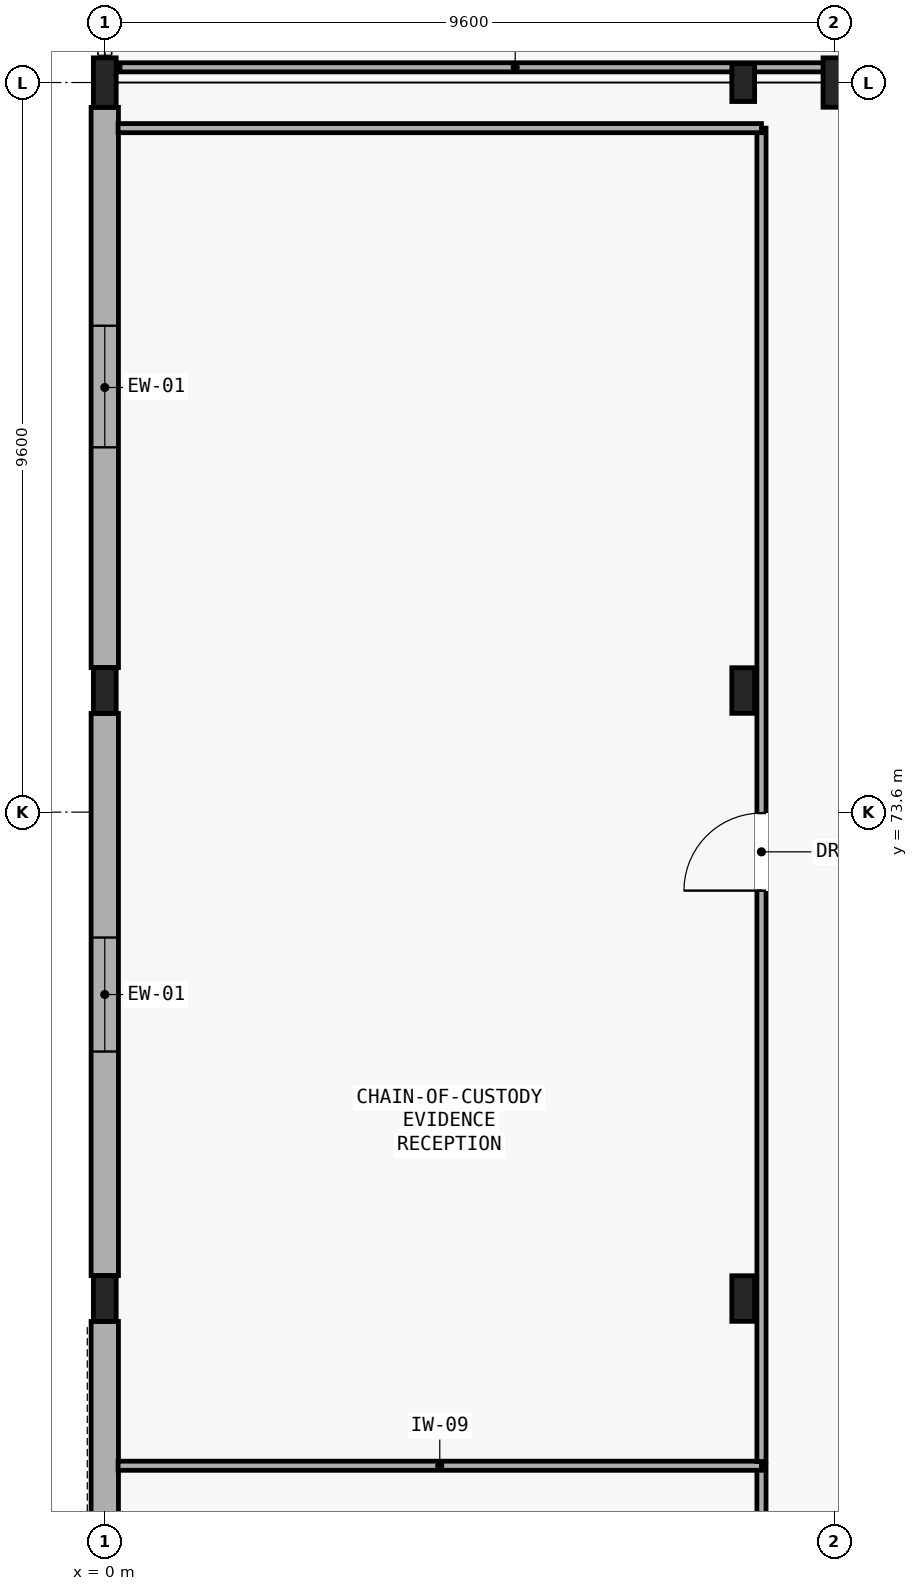
"""IFC4 building model, lengths in metres.
Left out: names, types, materials, properties, quantities, classifications, styles, units other than length and angle.
Written with IfcOpenShell. Run it as: python <this file> out.ifc"""

import sys

from ifc_helpers import new_model, si_unit, direction, frame, frame_2d, origin, origin_2d, place, context, subcontext, project, spatial, rectangle, i_section, extrude, element, fill, save


model = new_model("IFC4")
c1 = context("Model", 3, precision=1e-05, world=origin(), true_north=direction((0.0, 1.0)))
c2 = subcontext(c1, "Body", "Model", "MODEL_VIEW")
j1 = project(units=[si_unit("LENGTHUNIT", "METRE"), si_unit("PLANEANGLEUNIT", "RADIAN")], contexts=[c1])
p1 = place(None, origin())
s1 = spatial("IfcSite", under=j1, at=p1, CompositionType="ELEMENT")
p2 = place(p1, origin())
s2 = spatial("IfcBuilding", under=s1, at=p2, CompositionType="ELEMENT")
p3 = place(p2, origin())
s3 = spatial("IfcBuildingStorey", under=s2, at=p3, CompositionType="ELEMENT", Elevation=0.0)
for number, where, z_axis, x_axis in (
    (1, (0.0, 83.2, 0.0), (0.0, 0.0, 1.0), (1.0, 0.0, 0.0)),
    (2, (9.6, 83.2, 0.0), (0.0, 0.0, 1.0), (1.0, 0.0, 0.0)),
):
    element("IfcColumn", number, at=place(p3, frame(where, z_axis=z_axis, x_axis=x_axis)), inside=s3, PredefinedType="COLUMN", context=c2, shape_type="SweptSolid", body=[
        extrude(i_section(OverallWidth=0.3, OverallDepth=0.65, WebThickness=0.016, FlangeThickness=0.031, FilletRadius=0.027, at=origin_2d()), origin(), (0.0, 0.0, 1.0), 5.25),
    ])
for number, where, z_axis, x_axis in (
    (3, (0.0, 67.2, 0.0), (0.0, 0.0, 1.0), (1.0, 0.0, 0.0)),
    (4, (8.4, 67.2, 0.0), (0.0, 0.0, 1.0), (1.0, 0.0, 0.0)),
    (5, (0.0, 75.2, 0.0), (0.0, 0.0, 1.0), (1.0, 0.0, 0.0)),
    (6, (8.4, 75.2, 0.0), (0.0, 0.0, 1.0), (1.0, 0.0, 0.0)),
):
    element("IfcColumn", number, at=place(p3, frame(where, z_axis=z_axis, x_axis=x_axis)), inside=s3, PredefinedType="COLUMN", context=c2, shape_type="SweptSolid", body=[
        extrude(i_section(OverallWidth=0.3, OverallDepth=0.6, WebThickness=0.015, FlangeThickness=0.03, FilletRadius=0.027, at=origin_2d()), origin(), (0.0, 0.0, 1.0), 5.25),
    ])
p4 = place(p3, frame((8.4, 83.2, 0.0), z_axis=(0.0, 0.0, 1.0), x_axis=(1.0, 0.0, 0.0)))
e7 = element("IfcColumn", 7, at=p4, inside=s3, PredefinedType="COLUMN", context=c2, shape_type="SweptSolid", body=[
    extrude(i_section(OverallWidth=0.3, OverallDepth=0.5, WebThickness=0.014, FlangeThickness=0.028, FilletRadius=0.027, at=origin_2d()), origin(), (0.0, 0.0, 1.0), 5.25),
])
p5 = place(p3, frame((0.0, 57.902, 0.0), z_axis=(0.0, 0.0, 1.0), x_axis=(0.0, 1.0, 0.0)))
e8 = element("IfcWall", 8, at=p5, inside=s3, PredefinedType="SOLIDWALL", context=c2, shape_type="SweptSolid", body=[
    extrude(rectangle(XDim=8.996, YDim=0.36, at=frame_2d((4.498, 0.0))), origin(), (0.0, 0.0, 1.0), 4.54),
])
p6 = place(p3, frame((0.0, 67.502, 0.0), z_axis=(0.0, 0.0, 1.0), x_axis=(0.0, 1.0, 0.0)))
e9 = element("IfcWall", 9, at=p6, inside=s3, PredefinedType="SOLIDWALL", context=c2, shape_type="SweptSolid", body=[
    extrude(rectangle(XDim=7.396, YDim=0.36, at=frame_2d((3.698, 0.0))), origin(), (0.0, 0.0, 1.0), 4.54),
])
p7 = place(p6, frame((2.948, 0.0, 0.9)))
e10 = element("IfcOpeningElement", 10, at=p7, cuts=e9, PredefinedType="OPENING", context=c2, shape_type="SweptSolid", body=[
    extrude(rectangle(XDim=1.5, YDim=1.45, at=frame_2d((0.75, 0.725))), frame((0.0, 0.19, 0.0), z_axis=(0.0, -1.0, 0.0), x_axis=(1.0, 0.0, 0.0)), (0.0, 0.0, 1.0), 0.38),
])
p8 = place(p3, frame((0.0, 75.502, 0.0), z_axis=(0.0, 0.0, 1.0), x_axis=(0.0, 1.0, 0.0)))
e11 = element("IfcWall", 11, at=p8, inside=s3, PredefinedType="SOLIDWALL", context=c2, shape_type="SweptSolid", body=[
    extrude(rectangle(XDim=7.371, YDim=0.36, at=frame_2d((3.686, 0.0))), origin(), (0.0, 0.0, 1.0), 4.54),
])
p9 = place(p8, frame((2.898, 0.0, 0.9)))
e12 = element("IfcOpeningElement", 12, at=p9, cuts=e11, PredefinedType="OPENING", context=c2, shape_type="SweptSolid", body=[
    extrude(rectangle(XDim=1.6, YDim=1.45, at=frame_2d((0.8, 0.725))), frame((0.0, 0.19, 0.0), z_axis=(0.0, -1.0, 0.0), x_axis=(1.0, 0.0, 0.0)), (0.0, 0.0, 1.0), 0.38),
])
p10 = place(p3, frame((0.2, 83.4, 0.0), z_axis=(0.0, 0.0, 1.0), x_axis=(1.0, 0.0, 0.0)))
e13 = element("IfcWall", 13, at=p10, inside=s3, PredefinedType="PARTITIONING", context=c2, shape_type="SweptSolid", body=[
    extrude(rectangle(XDim=10.4, YDim=0.12, at=frame_2d((5.2, 0.0))), origin(), (0.0, 0.0, 1.0), 4.08),
])
p11 = place(p3, frame((8.64, 48.25, 0.0), z_axis=(0.0, 0.0, 1.0), x_axis=(0.0, 1.0, 0.0)))
e14 = element("IfcWall", 14, at=p11, inside=s3, PredefinedType="PARTITIONING", context=c2, shape_type="SweptSolid", body=[
    extrude(rectangle(XDim=16.75, YDim=0.12, at=frame_2d((8.375, 0.0))), origin(), (0.0, 0.0, 1.0), 4.54),
])
p12 = place(p11, frame((6.885, 0.0, 0.0)))
e15 = element("IfcOpeningElement", 15, at=p12, cuts=e14, PredefinedType="OPENING", context=c2, shape_type="SweptSolid", body=[
    extrude(rectangle(XDim=0.98, YDim=2.1, at=frame_2d((0.49, 1.05))), frame((0.0, 0.07, 0.0), z_axis=(0.0, -1.0, 0.0), x_axis=(1.0, 0.0, 0.0)), (0.0, 0.0, 1.0), 0.14),
])
p13 = place(p3, frame((8.64, 65.0, 0.0), z_axis=(0.0, 0.0, 1.0), x_axis=(-1.0, 0.0, 0.0)))
e16 = element("IfcWall", 16, at=p13, inside=s3, PredefinedType="PARTITIONING", context=c2, shape_type="SweptSolid", body=[
    extrude(rectangle(XDim=8.465, YDim=0.12, at=frame_2d((4.232, 0.0))), origin(), (0.0, 0.0, 1.0), 5.0),
])
p14 = place(p3, frame((8.64, 65.055, 0.0), z_axis=(0.0, 0.0, 1.0), x_axis=(0.0, 1.0, 0.0)))
e17 = element("IfcWall", 17, at=p14, inside=s3, PredefinedType="PARTITIONING", context=c2, shape_type="SweptSolid", body=[
    extrude(rectangle(XDim=17.545, YDim=0.12, at=frame_2d((8.772, 0.0))), origin(), (0.0, 0.0, 1.0), 4.54),
])
p15 = place(p14, frame((7.512, 0.0, 0.0)))
e18 = element("IfcOpeningElement", 18, at=p15, cuts=e17, PredefinedType="OPENING", context=c2, shape_type="SweptSolid", body=[
    extrude(rectangle(XDim=1.02, YDim=2.1, at=frame_2d((0.51, 1.05))), frame((0.0, 0.07, 0.0), z_axis=(0.0, -1.0, 0.0), x_axis=(1.0, 0.0, 0.0)), (0.0, 0.0, 1.0), 0.14),
])
p16 = place(p3, frame((8.64, 82.6, 0.0), z_axis=(0.0, 0.0, 1.0), x_axis=(-1.0, 0.0, 0.0)))
e19 = element("IfcWall", 19, at=p16, inside=s3, PredefinedType="PARTITIONING", context=c2, shape_type="SweptSolid", body=[
    extrude(rectangle(XDim=8.465, YDim=0.12, at=frame_2d((4.232, 0.0))), origin(), (0.0, 0.0, 1.0), 5.0),
])
p17 = place(p7, origin())
e20 = element("IfcWindow", 20, at=p17, inside=s3, PartitioningType="SINGLE_PANEL", PredefinedType="WINDOW", context=c2, shape_type="SweptSolid", body=[
    extrude(rectangle(XDim=1.5, YDim=1.45, at=frame_2d((0.75, 0.725))), frame((0.0, 0.03, 0.0), z_axis=(0.0, -1.0, 0.0), x_axis=(1.0, 0.0, 0.0)), (0.0, 0.0, 1.0), 0.06),
])
fill(e10, e20)
p18 = place(p9, origin())
e21 = element("IfcWindow", 21, at=p18, inside=s3, PartitioningType="SINGLE_PANEL", PredefinedType="WINDOW", context=c2, shape_type="SweptSolid", body=[
    extrude(rectangle(XDim=1.6, YDim=1.45, at=frame_2d((0.8, 0.725))), frame((0.0, 0.03, 0.0), z_axis=(0.0, -1.0, 0.0), x_axis=(1.0, 0.0, 0.0)), (0.0, 0.0, 1.0), 0.06),
])
fill(e12, e21)
p19 = place(p15, origin())
e22 = element("IfcDoor", 22, at=p19, inside=s3, OperationType="SINGLE_SWING_LEFT", PredefinedType="DOOR", context=c2, shape_type="SweptSolid", body=[
    extrude(rectangle(XDim=1.02, YDim=2.1, at=frame_2d((0.51, 1.05))), frame((0.0, 0.025, 0.0), z_axis=(0.0, -1.0, 0.0), x_axis=(1.0, 0.0, 0.0)), (0.0, 0.0, 1.0), 0.05),
])
fill(e18, e22)
save(model, sys.argv[1])
